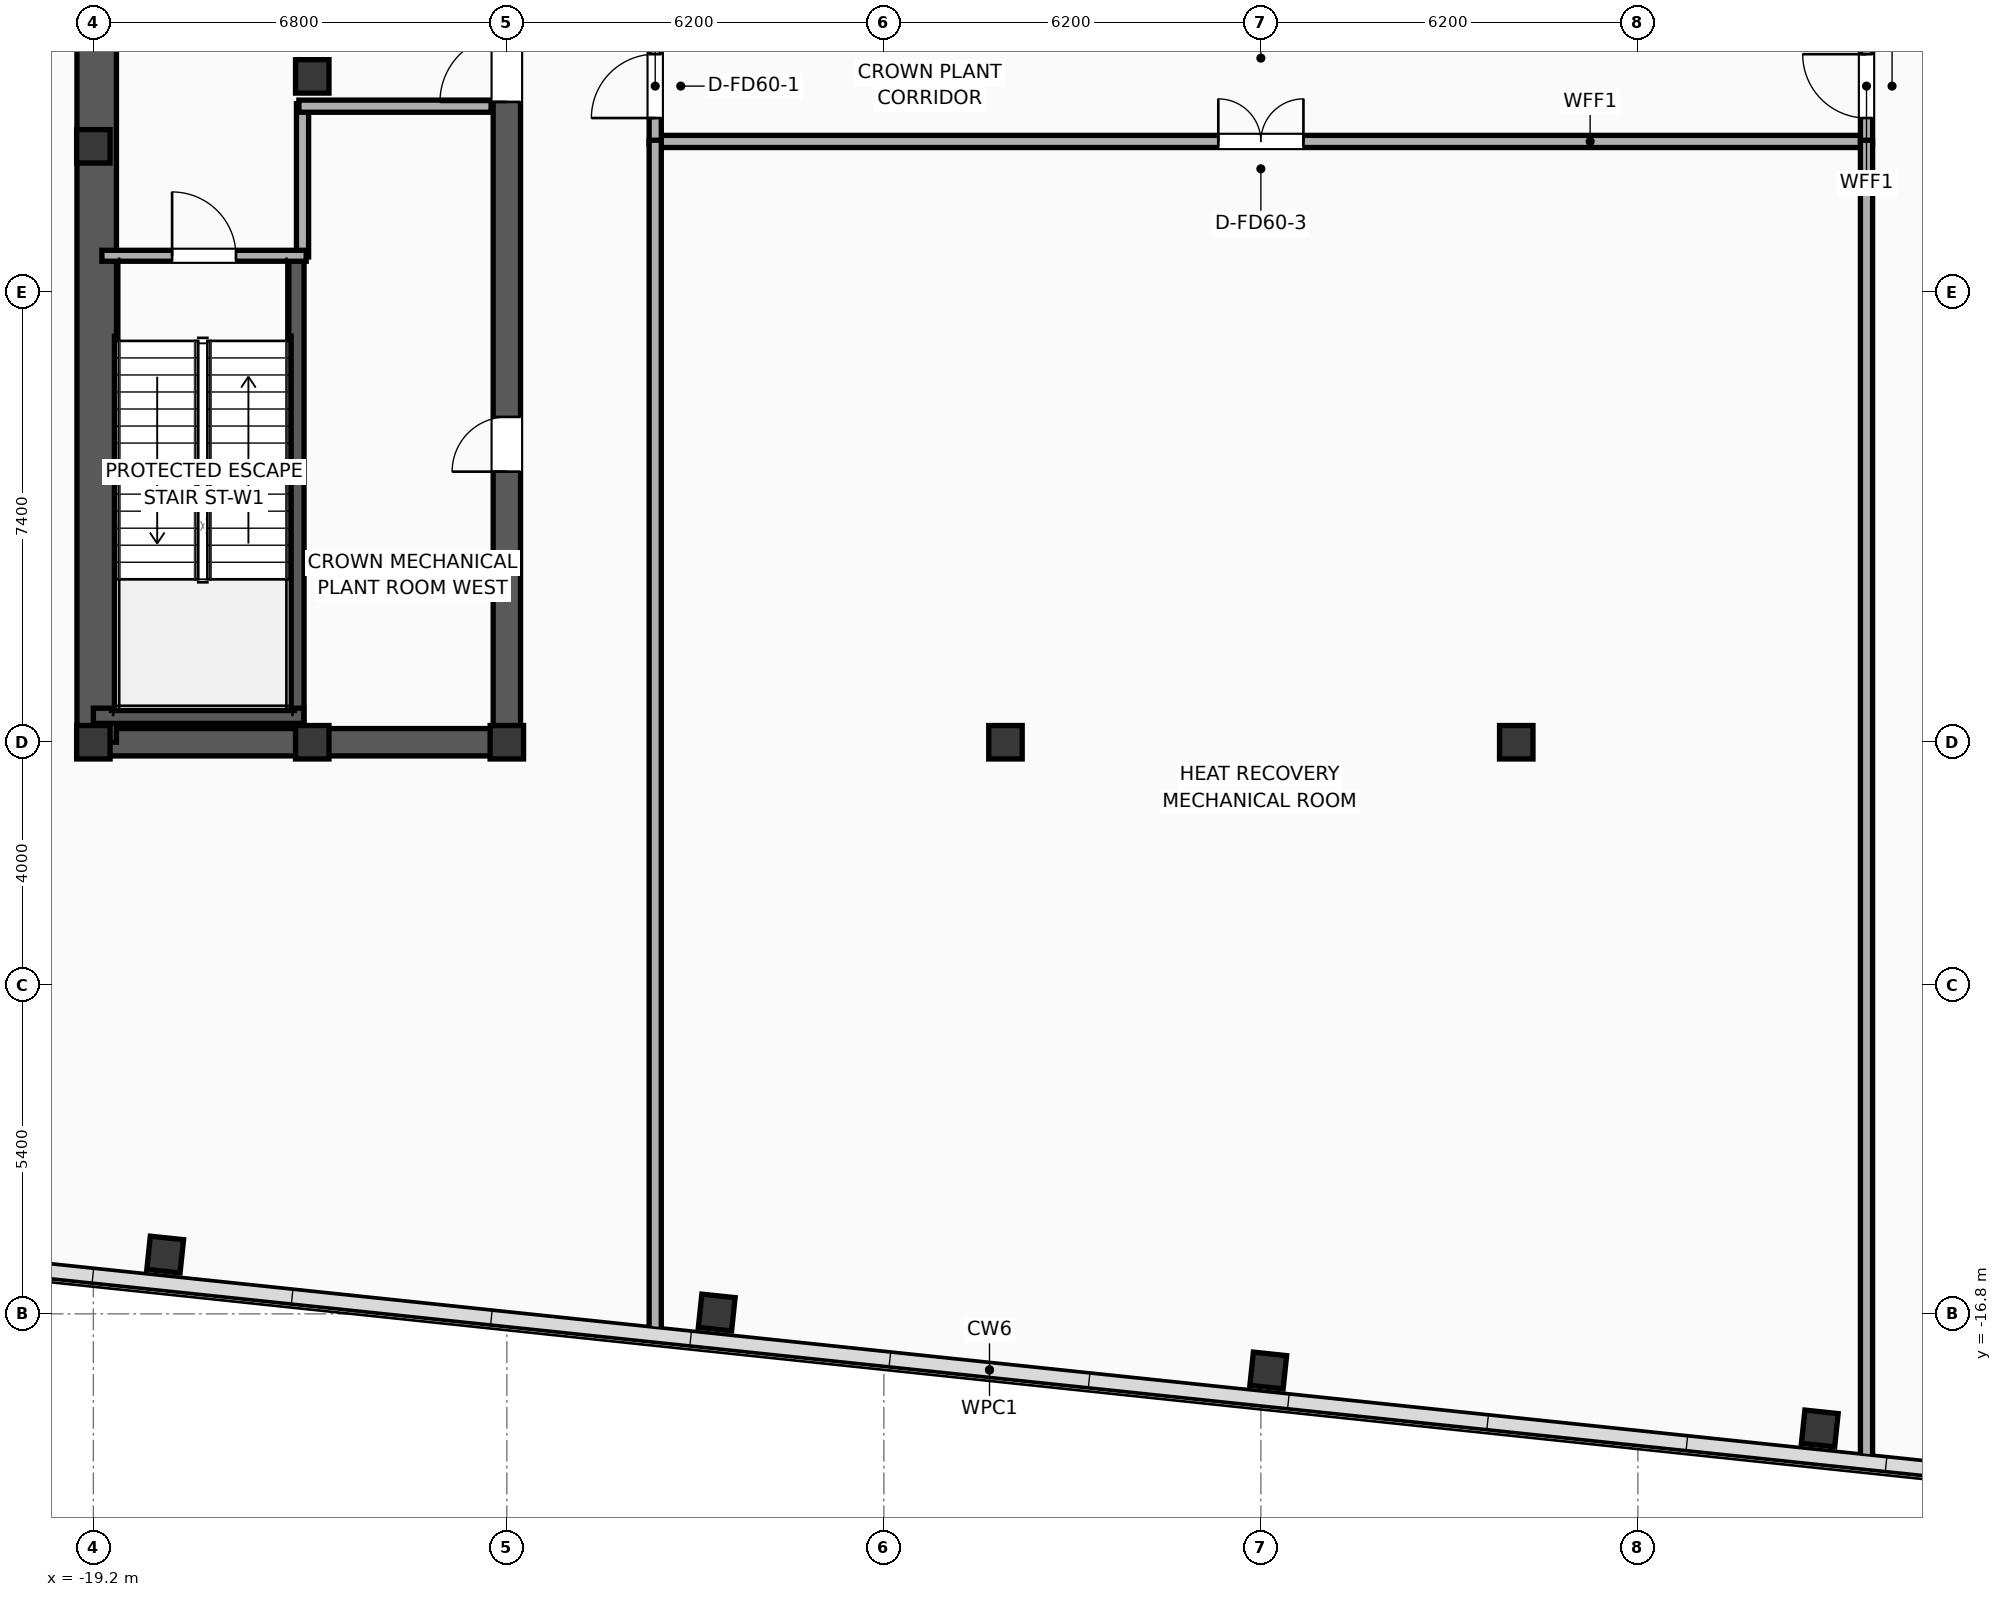
"""IFC4 building model, lengths in metres.
Left out: names, types, materials, properties, quantities, classifications, styles, units other than length and angle.
Written with IfcOpenShell. Run it as: python <this file> out.ifc"""

import sys

from ifc_helpers import new_model, si_unit, direction, frame, frame_2d, origin, origin_2d, place, context, subcontext, project, spatial, rectangle, hollow_rectangle, extrude, element, fill, save


model = new_model("IFC4")
c1 = context("Model", 3, precision=1e-05, world=origin(), true_north=direction((0.0, 1.0)))
c2 = subcontext(c1, "Body", "Model", "MODEL_VIEW")
j1 = project(units=[si_unit("LENGTHUNIT", "METRE"), si_unit("PLANEANGLEUNIT", "RADIAN")], contexts=[c1])
p1 = place(None, origin())
s1 = spatial("IfcSite", under=j1, at=p1, CompositionType="ELEMENT")
p2 = place(p1, origin())
s2 = spatial("IfcBuilding", under=s1, at=p2, CompositionType="ELEMENT")
p3 = place(p2, frame((0.0, 0.0, 316.0)))
s3 = spatial("IfcBuildingStorey", under=s2, at=p3, CompositionType="ELEMENT", Elevation=316.0)
for number, where, z_axis, x_axis in (
    (1, (-19.2, -7.4, 0.0), (0.0, 0.0, 1.0), (1.0, 0.0, 0.0)),
    (2, (-19.2, 2.4, 0.0), (0.0, 0.0, 1.0), (1.0, 0.0, 0.0)),
    (3, (-15.6, -7.4, 0.0), (0.0, 0.0, 1.0), (1.0, 0.0, 0.0)),
    (4, (-12.4, -7.4, 0.0), (0.0, 0.0, 1.0), (1.0, 0.0, 0.0)),
    (5, (-15.6, 3.55, 0.0), (0.0, 0.0, 1.0), (1.0, 0.0, 0.0)),
):
    element("IfcColumn", number, at=place(p3, frame(where, z_axis=z_axis, x_axis=x_axis)), inside=s3, PredefinedType="COLUMN", context=c2, shape_type="SweptSolid", body=[
        extrude(hollow_rectangle(XDim=0.55, YDim=0.55, WallThickness=0.022, at=origin_2d()), origin(), (0.0, 0.0, 1.0), 5.3),
    ])
p4 = place(p3, frame((-19.425, -7.4, 0.0), z_axis=(0.0, 0.0, 1.0), x_axis=(1.0, 0.0, 0.0)))
e6 = element("IfcWall", 6, at=p4, inside=s3, PredefinedType="SHEAR", context=c2, shape_type="SweptSolid", body=[
    extrude(rectangle(XDim=7.25, YDim=0.45, at=frame_2d((3.625, 0.0))), origin(), (0.0, 0.0, 1.0), 5.025),
])
p5 = place(p3, frame((-19.145, -7.4, 0.0), z_axis=(0.0, 0.0, 1.0), x_axis=(0.0, 1.0, 0.0)))
e7 = element("IfcWall", 7, at=p5, inside=s3, PredefinedType="SHEAR", context=c2, shape_type="SweptSolid", body=[
    extrude(rectangle(XDim=14.8, YDim=0.65, at=frame_2d((7.4, 0.0))), origin(), (0.0, 0.0, 1.0), 5.025),
])
p6 = place(p3, frame((-12.4, -7.4, 0.0), z_axis=(0.0, 0.0, 1.0), x_axis=(0.0, 1.0, 0.0)))
e8 = element("IfcWall", 8, at=p6, inside=s3, PredefinedType="SHEAR", context=c2, shape_type="SweptSolid", body=[
    extrude(rectangle(XDim=14.8, YDim=0.45, at=frame_2d((7.4, 0.0))), origin(), (0.0, 0.0, 1.0), 5.025),
])
p7 = place(p6, frame((10.53, 0.0, 0.0)))
e9 = element("IfcOpeningElement", 9, at=p7, cuts=e8, PredefinedType="OPENING", context=c2, shape_type="SweptSolid", body=[
    extrude(rectangle(XDim=1.1, YDim=2.05, at=frame_2d((0.55, 1.025))), frame((0.0, 0.235, 0.0), z_axis=(0.0, -1.0, 0.0), x_axis=(1.0, 0.0, 0.0)), (0.0, 0.0, 1.0), 0.47),
])
p8 = place(p6, frame((4.45, 0.0, 0.0)))
e10 = element("IfcOpeningElement", 10, at=p8, cuts=e8, PredefinedType="OPENING", context=c2, shape_type="SweptSolid", body=[
    extrude(rectangle(XDim=0.9, YDim=2.05, at=frame_2d((0.45, 1.025))), frame((0.0, 0.235, 0.0), z_axis=(0.0, -1.0, 0.0), x_axis=(1.0, 0.0, 0.0)), (0.0, 0.0, 1.0), 0.47),
])
p9 = place(p3, frame((-15.86, -7.085, 0.0), z_axis=(0.0, 0.0, 1.0), x_axis=(0.0, 1.0, 0.0)))
e11 = element("IfcWall", 11, at=p9, inside=s3, PredefinedType="SOLIDWALL", context=c2, shape_type="SweptSolid", body=[
    extrude(rectangle(XDim=7.685, YDim=0.25, at=frame_2d((3.843, 0.0))), origin(), (0.0, 0.0, 1.0), 5.025),
])
p10 = place(p3, frame((-19.2, -6.965, 0.0), z_axis=(0.0, 0.0, 1.0), x_axis=(1.0, 0.0, 0.0)))
e12 = element("IfcWall", 12, at=p10, inside=s3, PredefinedType="SOLIDWALL", context=c2, shape_type="SweptSolid", body=[
    extrude(rectangle(XDim=3.46, YDim=0.25, at=frame_2d((1.73, 0.0))), origin(), (0.0, 0.0, 1.0), 5.025),
])
for number, where, z_axis, x_axis in (
    (13, (-4.2, -7.4, 0.0), (0.0, 0.0, 1.0), (1.0, 0.0, 0.0)),
    (14, (4.2, -7.4, 0.0), (0.0, 0.0, 1.0), (1.0, 0.0, 0.0)),
    (15, (-18.019, -15.825, 0.0), (0.0, 0.0, 1.0), (0.995, -0.105, 0.0)),
    (16, (-8.948, -16.778, 0.0), (0.0, 0.0, 1.0), (0.995, -0.105, 0.0)),
    (17, (0.121, -17.732, 0.0), (0.0, 0.0, 1.0), (0.995, -0.105, 0.0)),
    (18, (9.191, -18.685, 0.0), (0.0, 0.0, 1.0), (0.995, -0.105, 0.0)),
):
    element("IfcColumn", number, at=place(p3, frame(where, z_axis=z_axis, x_axis=x_axis)), inside=s3, PredefinedType="COLUMN", context=c2, shape_type="SweptSolid", body=[
        extrude(hollow_rectangle(XDim=0.55, YDim=0.55, WallThickness=0.022, at=origin_2d()), origin(), (0.0, 0.0, 1.0), 5.3),
    ])
p11 = place(p3, frame((18.195, -20.104, 0.0), z_axis=(0.0, 0.0, 1.0), x_axis=(-0.994522116558, 0.104526358762, 0.0)))
e19 = element("IfcWall", 19, at=p11, inside=s3, PredefinedType="PARAPET", context=c2, shape_type="SweptSolid", body=[
    extrude(rectangle(XDim=45.564, YDim=0.22, at=frame_2d((22.782, 0.0))), origin(), (0.0, 0.0, 1.0), 1.2),
])
p12 = place(p3, frame((-15.76, 0.58, 0.0), z_axis=(0.0, 0.0, 1.0), x_axis=(0.0, 1.0, 0.0)))
e20 = element("IfcWall", 20, at=p12, inside=s3, PredefinedType="PARTITIONING", context=c2, shape_type="SweptSolid", body=[
    extrude(rectangle(XDim=2.52, YDim=0.2, at=frame_2d((1.26, 0.0))), origin(), (0.0, 0.0, 1.0), 5.025),
])
p13 = place(p3, frame((-15.82, 3.06, 0.0), z_axis=(0.0, 0.0, 1.0), x_axis=(1.0, 0.0, 0.0)))
e21 = element("IfcWall", 21, at=p13, inside=s3, PredefinedType="PARTITIONING", context=c2, shape_type="SweptSolid", body=[
    extrude(rectangle(XDim=3.16, YDim=0.2, at=frame_2d((1.58, 0.0))), origin(), (0.0, 0.0, 1.0), 5.025),
])
p14 = place(p3, frame((-19.06, 0.6, 0.0), z_axis=(0.0, 0.0, 1.0), x_axis=(1.0, 0.0, 0.0)))
e22 = element("IfcWall", 22, at=p14, inside=s3, PredefinedType="PARTITIONING", context=c2, shape_type="SweptSolid", body=[
    extrude(rectangle(XDim=3.36, YDim=0.18, at=frame_2d((1.68, 0.0))), origin(), (0.0, 0.0, 1.0), 5.025),
])
p15 = place(p14, frame((1.155, 0.0, 0.0)))
e23 = element("IfcOpeningElement", 23, at=p15, cuts=e22, PredefinedType="OPENING", context=c2, shape_type="SweptSolid", body=[
    extrude(rectangle(XDim=1.05, YDim=2.05, at=frame_2d((0.525, 1.025))), frame((0.0, 0.1, 0.0), z_axis=(0.0, -1.0, 0.0), x_axis=(1.0, 0.0, 0.0)), (0.0, 0.0, 1.0), 0.2),
])
p16 = place(p3, frame((-9.98, 2.48, 0.0), z_axis=(0.0, 0.0, 1.0), x_axis=(1.0, 0.0, 0.0)))
e24 = element("IfcWall", 24, at=p16, inside=s3, PredefinedType="PARTITIONING", context=c2, shape_type="SweptSolid", body=[
    extrude(rectangle(XDim=19.96, YDim=0.2, at=frame_2d((9.98, 0.0))), origin(), (0.0, 0.0, 1.0), 4.595),
])
p17 = place(p16, frame((9.28, 0.0, 0.0)))
e25 = element("IfcOpeningElement", 25, at=p17, cuts=e24, PredefinedType="OPENING", context=c2, shape_type="SweptSolid", body=[
    extrude(rectangle(XDim=1.4, YDim=2.05, at=frame_2d((0.7, 1.025))), frame((0.0, 0.11, 0.0), z_axis=(0.0, -1.0, 0.0), x_axis=(1.0, 0.0, 0.0)), (0.0, 0.0, 1.0), 0.22),
])
p18 = place(p3, frame((-9.96, 2.44, 0.0), z_axis=(0.0, 0.0, 1.0), x_axis=(0.0, 1.0, 0.0)))
e26 = element("IfcWall", 26, at=p18, inside=s3, PredefinedType="PARTITIONING", context=c2, shape_type="SweptSolid", body=[
    extrude(rectangle(XDim=1.9, YDim=0.2, at=frame_2d((0.95, 0.0))), origin(), (0.0, 0.0, 1.0), 5.025),
])
p19 = place(p18, frame((0.425, 0.0, 0.0)))
e27 = element("IfcOpeningElement", 27, at=p19, cuts=e26, PredefinedType="OPENING", context=c2, shape_type="SweptSolid", body=[
    extrude(rectangle(XDim=1.05, YDim=2.05, at=frame_2d((0.525, 1.025))), frame((0.0, 0.11, 0.0), z_axis=(0.0, -1.0, 0.0), x_axis=(1.0, 0.0, 0.0)), (0.0, 0.0, 1.0), 0.22),
])
p20 = place(p3, frame((9.96, 2.44, 0.0), z_axis=(0.0, 0.0, 1.0), x_axis=(0.0, 1.0, 0.0)))
e28 = element("IfcWall", 28, at=p20, inside=s3, PredefinedType="PARTITIONING", context=c2, shape_type="SweptSolid", body=[
    extrude(rectangle(XDim=1.9, YDim=0.2, at=frame_2d((0.95, 0.0))), origin(), (0.0, 0.0, 1.0), 5.025),
])
p21 = place(p20, frame((0.425, 0.0, 0.0)))
e29 = element("IfcOpeningElement", 29, at=p21, cuts=e28, PredefinedType="OPENING", context=c2, shape_type="SweptSolid", body=[
    extrude(rectangle(XDim=1.05, YDim=2.05, at=frame_2d((0.525, 1.025))), frame((0.0, 0.11, 0.0), z_axis=(0.0, -1.0, 0.0), x_axis=(1.0, 0.0, 0.0)), (0.0, 0.0, 1.0), 0.22),
])
p22 = place(p3, frame((-9.96, -17.125, 0.0), z_axis=(0.0, 0.0, 1.0), x_axis=(0.0, 1.0, 0.0)))
e30 = element("IfcWall", 30, at=p22, inside=s3, PredefinedType="PARTITIONING", context=c2, shape_type="SweptSolid", body=[
    extrude(rectangle(XDim=19.625, YDim=0.2, at=frame_2d((9.812, 0.0))), origin(), (0.0, 0.0, 1.0), 3.915),
])
p23 = place(p3, frame((9.96, -19.218, 0.0), z_axis=(0.0, 0.0, 1.0), x_axis=(0.0, 1.0, 0.0)))
e31 = element("IfcWall", 31, at=p23, inside=s3, PredefinedType="PARTITIONING", context=c2, shape_type="SweptSolid", body=[
    extrude(rectangle(XDim=21.718, YDim=0.2, at=frame_2d((10.859, 0.0))), origin(), (0.0, 0.0, 1.0), 3.915),
])
p24 = place(p15, origin())
e32 = element("IfcDoor", 32, at=p24, inside=s3, OperationType="SINGLE_SWING_LEFT", PredefinedType="DOOR", context=c2, shape_type="SweptSolid", body=[
    extrude(rectangle(XDim=1.05, YDim=2.05, at=frame_2d((0.525, 1.025))), frame((0.0, 0.025, 0.0), z_axis=(0.0, -1.0, 0.0), x_axis=(1.0, 0.0, 0.0)), (0.0, 0.0, 1.0), 0.05),
])
fill(e23, e32)
p25 = place(p17, origin())
e33 = element("IfcDoor", 33, at=p25, inside=s3, OperationType="DOUBLE_DOOR_SINGLE_SWING", PredefinedType="DOOR", context=c2, shape_type="SweptSolid", body=[
    extrude(rectangle(XDim=1.4, YDim=2.05, at=frame_2d((0.7, 1.025))), frame((0.0, 0.025, 0.0), z_axis=(0.0, -1.0, 0.0), x_axis=(1.0, 0.0, 0.0)), (0.0, 0.0, 1.0), 0.05),
])
fill(e25, e33)
p26 = place(p19, origin())
e34 = element("IfcDoor", 34, at=p26, inside=s3, OperationType="SINGLE_SWING_LEFT", PredefinedType="DOOR", context=c2, shape_type="SweptSolid", body=[
    extrude(rectangle(XDim=1.05, YDim=2.05, at=frame_2d((0.525, 1.025))), frame((0.0, 0.025, 0.0), z_axis=(0.0, -1.0, 0.0), x_axis=(1.0, 0.0, 0.0)), (0.0, 0.0, 1.0), 0.05),
])
fill(e27, e34)
p27 = place(p21, origin())
e35 = element("IfcDoor", 35, at=p27, inside=s3, OperationType="SINGLE_SWING_RIGHT", PredefinedType="DOOR", context=c2, shape_type="SweptSolid", body=[
    extrude(rectangle(XDim=1.05, YDim=2.05, at=frame_2d((0.525, 1.025))), frame((0.0, 0.025, 0.0), z_axis=(0.0, -1.0, 0.0), x_axis=(1.0, 0.0, 0.0)), (0.0, 0.0, 1.0), 0.05),
])
fill(e29, e35)
p28 = place(p7, origin())
e36 = element("IfcDoor", 36, at=p28, inside=s3, OperationType="SINGLE_SWING_LEFT", PredefinedType="DOOR", context=c2, shape_type="SweptSolid", body=[
    extrude(rectangle(XDim=1.1, YDim=2.05, at=frame_2d((0.55, 1.025))), frame((0.0, 0.025, 0.0), z_axis=(0.0, -1.0, 0.0), x_axis=(1.0, 0.0, 0.0)), (0.0, 0.0, 1.0), 0.05),
])
fill(e9, e36)
p29 = place(p8, origin())
e37 = element("IfcDoor", 37, at=p29, inside=s3, OperationType="SINGLE_SWING_LEFT", PredefinedType="DOOR", context=c2, shape_type="SweptSolid", body=[
    extrude(rectangle(XDim=0.9, YDim=2.05, at=frame_2d((0.45, 1.025))), frame((0.0, 0.025, 0.0), z_axis=(0.0, -1.0, 0.0), x_axis=(1.0, 0.0, 0.0)), (0.0, 0.0, 1.0), 0.05),
])
fill(e10, e37)
save(model, sys.argv[1])
